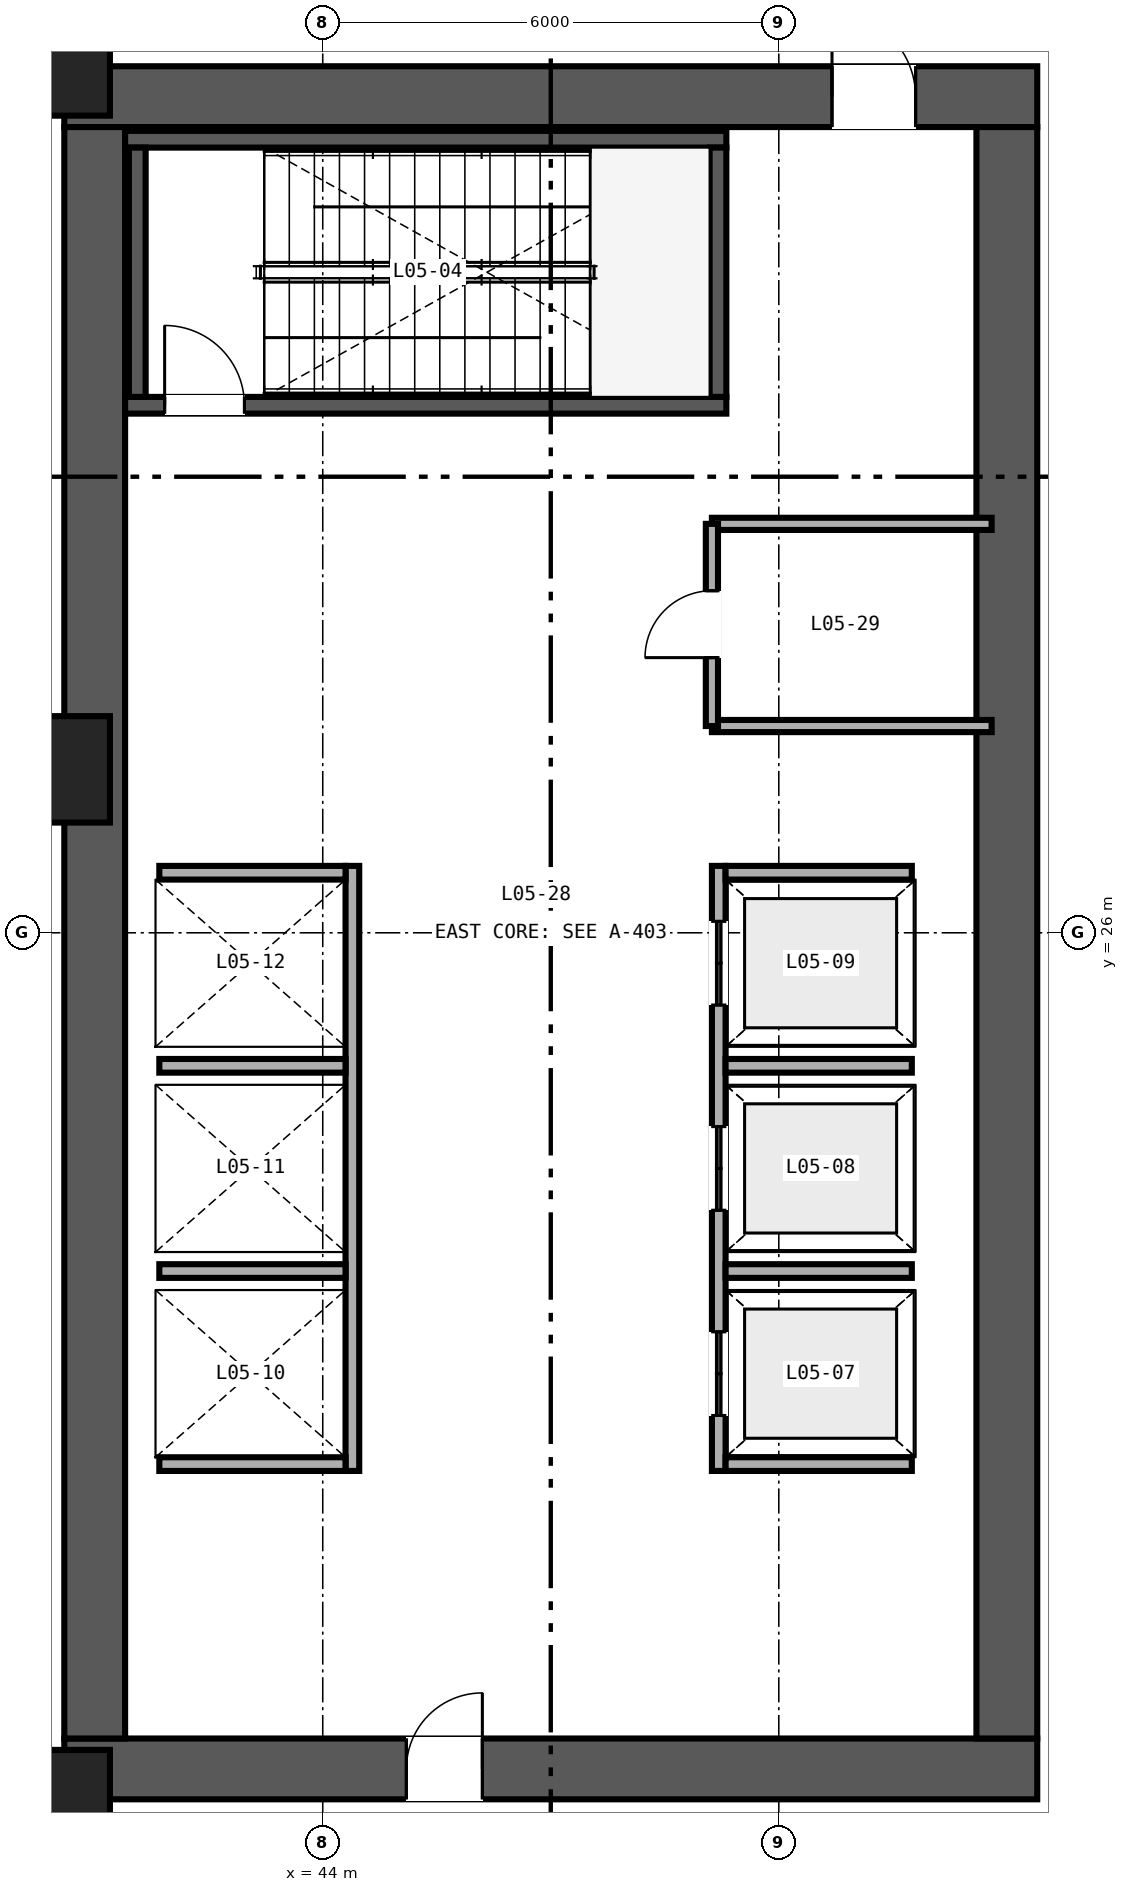
"""IFC4 building model, lengths in metres.
Left out: names, types, materials, properties, quantities, classifications, styles, units other than length and angle.
Written with IfcOpenShell. Run it as: python <this file> out.ifc"""

import sys

from ifc_helpers import new_model, si_unit, direction, frame, frame_2d, origin, origin_2d, place, context, subcontext, project, spatial, rectangle, extrude, source, transform, mapped, element, fill, save


model = new_model("IFC4")
c1 = context("Model", 3, precision=1e-05, world=origin(), true_north=direction((0.0, 1.0)))
c2 = subcontext(c1, "Body", "Model", "MODEL_VIEW")
j1 = project(units=[si_unit("LENGTHUNIT", "METRE"), si_unit("PLANEANGLEUNIT", "RADIAN")], contexts=[c1])
p1 = place(None, origin())
s1 = spatial("IfcSite", under=j1, at=p1, CompositionType="ELEMENT")
p2 = place(p1, origin())
s2 = spatial("IfcBuilding", under=s1, at=p2, CompositionType="ELEMENT")
p3 = place(p2, frame((0.0, 0.0, 24.0)))
s3 = spatial("IfcBuildingStorey", under=s2, at=p3, CompositionType="ELEMENT", Elevation=24.0)
p4 = place(p3, frame((40.6, 15.0, 0.0), z_axis=(0.0, 0.0, 1.0), x_axis=(1.0, 0.0, 0.0)))
e1 = element("IfcWall", 1, at=p4, inside=s3, PredefinedType="SHEAR", context=c2, shape_type="SweptSolid", body=[
    extrude(rectangle(XDim=12.8, YDim=0.8, at=frame_2d((6.4, 0.0))), origin(), (0.0, 0.0, 1.0), 4.48),
])
p5 = place(p4, frame((4.5, 0.0, 0.0)))
e2 = element("IfcOpeningElement", 2, at=p5, cuts=e1, PredefinedType="OPENING", context=c2, shape_type="SweptSolid", body=[
    extrude(rectangle(XDim=1.0, YDim=2.15, at=frame_2d((0.5, 1.075))), frame((0.0, 0.41, 0.0), z_axis=(0.0, -1.0, 0.0), x_axis=(1.0, 0.0, 0.0)), (0.0, 0.0, 1.0), 0.82),
])
p6 = place(p3, frame((40.6, 37.0, 0.0), z_axis=(0.0, 0.0, 1.0), x_axis=(1.0, 0.0, 0.0)))
e3 = element("IfcWall", 3, at=p6, inside=s3, PredefinedType="SHEAR", context=c2, shape_type="SweptSolid", body=[
    extrude(rectangle(XDim=12.8, YDim=0.8, at=frame_2d((6.4, 0.0))), origin(), (0.0, 0.0, 1.0), 4.48),
])
p7 = place(p6, frame((10.1, 0.0, 0.0)))
e4 = element("IfcOpeningElement", 4, at=p7, cuts=e3, PredefinedType="OPENING", context=c2, shape_type="SweptSolid", body=[
    extrude(rectangle(XDim=1.1, YDim=2.15, at=frame_2d((0.55, 1.075))), frame((0.0, 0.41, 0.0), z_axis=(0.0, -1.0, 0.0), x_axis=(1.0, 0.0, 0.0)), (0.0, 0.0, 1.0), 0.82),
])
for number, where, z_axis, x_axis in (
    (5, (41.0, 15.4, 0.0), (0.0, 0.0, 1.0), (0.0, 1.0, 0.0)),
    (6, (53.0, 15.4, 0.0), (0.0, 0.0, 1.0), (0.0, 1.0, 0.0)),
):
    element("IfcWall", number, at=place(p3, frame(where, z_axis=z_axis, x_axis=x_axis)), inside=s3, PredefinedType="SHEAR", context=c2, shape_type="SweptSolid", body=[
        extrude(rectangle(XDim=21.2, YDim=0.8, at=frame_2d((10.6, 0.0))), origin(), (0.0, 0.0, 1.0), 4.48),
    ])
p8 = place(p3, frame((41.4, 32.94, 0.0), z_axis=(0.0, 0.0, 1.0), x_axis=(1.0, 0.0, 0.0)))
e7 = element("IfcWall", 7, at=p8, inside=s3, PredefinedType="SHEAR", context=c2, shape_type="SweptSolid", body=[
    extrude(rectangle(XDim=7.91, YDim=0.22, at=frame_2d((3.955, 0.0))), origin(), (0.0, 0.0, 1.0), 4.6),
])
p9 = place(p8, frame((0.52, 0.0, 0.0)))
e8 = element("IfcOpeningElement", 8, at=p9, cuts=e7, PredefinedType="OPENING", context=c2, shape_type="SweptSolid", body=[
    extrude(rectangle(XDim=1.05, YDim=2.15, at=frame_2d((0.525, 1.075))), frame((0.0, 0.12, 0.0), z_axis=(0.0, -1.0, 0.0), x_axis=(1.0, 0.0, 0.0)), (0.0, 0.0, 1.0), 0.24),
])
p10 = place(p3, frame((41.4, 36.44, 0.0), z_axis=(0.0, 0.0, 1.0), x_axis=(1.0, 0.0, 0.0)))
e9 = element("IfcWall", 9, at=p10, inside=s3, PredefinedType="SHEAR", context=c2, shape_type="SweptSolid", body=[
    extrude(rectangle(XDim=7.91, YDim=0.22, at=frame_2d((3.955, 0.0))), origin(), (0.0, 0.0, 1.0), 4.6),
])
for number, where, z_axis, x_axis in (
    (10, (41.56, 33.05, 0.0), (0.0, 0.0, 1.0), (0.0, 1.0, 0.0)),
    (11, (49.2, 33.05, 0.0), (0.0, 0.0, 1.0), (0.0, 1.0, 0.0)),
):
    element("IfcWall", number, at=place(p3, frame(where, z_axis=z_axis, x_axis=x_axis)), inside=s3, PredefinedType="SHEAR", context=c2, shape_type="SweptSolid", body=[
        extrude(rectangle(XDim=3.28, YDim=0.22, at=frame_2d((1.64, 0.0))), origin(), (0.0, 0.0, 1.0), 4.6),
    ])
m1 = source(origin(), c2, "Body", "SweptSolid", [
    extrude(rectangle(XDim=1.4, YDim=1.4, at=origin_2d()), origin(), (0.0, 0.0, 1.0), 4.48),
])
for number, where, z_axis, x_axis in (
    (12, (40.5, 14.55, 0.0), (0.0, 0.0, 1.0), (1.0, 0.0, 0.0)),
    (13, (40.5, 28.15, 0.0), (0.0, 0.0, 1.0), (1.0, 0.0, 0.0)),
    (14, (40.5, 37.45, 0.0), (0.0, 0.0, 1.0), (1.0, 0.0, 0.0)),
):
    element("IfcColumn", number, at=place(p3, frame(where, z_axis=z_axis, x_axis=x_axis)), inside=s3, PredefinedType="COLUMN", context=c2, shape_type="MappedRepresentation", body=[
        mapped(m1, transform((0.0, 0.0, 0.0), scale=1.0)),
    ])
p11 = place(p3, frame((49.21, 18.92, 0.0), z_axis=(0.0, 0.0, 1.0), x_axis=(0.0, 1.0, 0.0)))
e15 = element("IfcWall", 15, at=p11, inside=s3, PredefinedType="SOLIDWALL", context=c2, shape_type="SweptSolid", body=[
    extrude(rectangle(XDim=7.96, YDim=0.18, at=frame_2d((3.98, 0.0))), origin(), (0.0, 0.0, 1.0), 4.48),
])
p12 = place(p11, frame((0.73, 0.0, 0.0)))
e16 = element("IfcOpeningElement", 16, at=p12, cuts=e15, PredefinedType="OPENING", context=c2, shape_type="SweptSolid", body=[
    extrude(rectangle(XDim=1.1, YDim=2.2, at=frame_2d((0.55, 1.1))), frame((0.0, 0.1, 0.0), z_axis=(0.0, -1.0, 0.0), x_axis=(1.0, 0.0, 0.0)), (0.0, 0.0, 1.0), 0.2),
])
p13 = place(p11, frame((3.43, 0.0, 0.0)))
e17 = element("IfcOpeningElement", 17, at=p13, cuts=e15, PredefinedType="OPENING", context=c2, shape_type="SweptSolid", body=[
    extrude(rectangle(XDim=1.1, YDim=2.2, at=frame_2d((0.55, 1.1))), frame((0.0, 0.1, 0.0), z_axis=(0.0, -1.0, 0.0), x_axis=(1.0, 0.0, 0.0)), (0.0, 0.0, 1.0), 0.2),
])
p14 = place(p11, frame((6.13, 0.0, 0.0)))
e18 = element("IfcOpeningElement", 18, at=p14, cuts=e15, PredefinedType="OPENING", context=c2, shape_type="SweptSolid", body=[
    extrude(rectangle(XDim=1.1, YDim=2.2, at=frame_2d((0.55, 1.1))), frame((0.0, 0.1, 0.0), z_axis=(0.0, -1.0, 0.0), x_axis=(1.0, 0.0, 0.0)), (0.0, 0.0, 1.0), 0.2),
])
for number, where, z_axis, x_axis in (
    (19, (49.3, 19.01, 0.0), (0.0, 0.0, 1.0), (1.0, 0.0, 0.0)),
    (20, (49.3, 26.79, 0.0), (0.0, 0.0, 1.0), (1.0, 0.0, 0.0)),
    (21, (49.3, 21.55, 0.0), (0.0, 0.0, 1.0), (1.0, 0.0, 0.0)),
    (22, (49.3, 24.25, 0.0), (0.0, 0.0, 1.0), (1.0, 0.0, 0.0)),
):
    element("IfcWall", number, at=place(p3, frame(where, z_axis=z_axis, x_axis=x_axis)), inside=s3, PredefinedType="SOLIDWALL", context=c2, shape_type="SweptSolid", body=[
        extrude(rectangle(XDim=2.45, YDim=0.18, at=frame_2d((1.225, 0.0))), origin(), (0.0, 0.0, 1.0), 4.48),
    ])
p15 = place(p3, frame((44.39, 18.92, 0.0), z_axis=(0.0, 0.0, 1.0), x_axis=(0.0, 1.0, 0.0)))
e23 = element("IfcWall", 23, at=p15, inside=s3, PredefinedType="SOLIDWALL", context=c2, shape_type="SweptSolid", body=[
    extrude(rectangle(XDim=7.96, YDim=0.18, at=frame_2d((3.98, 0.0))), origin(), (0.0, 0.0, 1.0), 4.48),
])
for number, where, z_axis, x_axis in (
    (24, (41.85, 19.01, 0.0), (0.0, 0.0, 1.0), (1.0, 0.0, 0.0)),
    (25, (41.85, 26.79, 0.0), (0.0, 0.0, 1.0), (1.0, 0.0, 0.0)),
    (26, (41.85, 21.55, 0.0), (0.0, 0.0, 1.0), (1.0, 0.0, 0.0)),
    (27, (41.85, 24.25, 0.0), (0.0, 0.0, 1.0), (1.0, 0.0, 0.0)),
):
    element("IfcWall", number, at=place(p3, frame(where, z_axis=z_axis, x_axis=x_axis)), inside=s3, PredefinedType="SOLIDWALL", context=c2, shape_type="SweptSolid", body=[
        extrude(rectangle(XDim=2.45, YDim=0.18, at=frame_2d((1.225, 0.0))), origin(), (0.0, 0.0, 1.0), 4.48),
    ])
p16 = place(p3, frame((49.12, 28.72, 0.0), z_axis=(0.0, 0.0, 1.0), x_axis=(1.0, 0.0, 0.0)))
e28 = element("IfcWall", 28, at=p16, inside=s3, PredefinedType="PARTITIONING", context=c2, shape_type="SweptSolid", body=[
    extrude(rectangle(XDim=3.68, YDim=0.16, at=frame_2d((1.84, 0.0))), origin(), (0.0, 0.0, 1.0), 4.48),
])
p17 = place(p3, frame((49.12, 31.38, 0.0), z_axis=(0.0, 0.0, 1.0), x_axis=(1.0, 0.0, 0.0)))
e29 = element("IfcWall", 29, at=p17, inside=s3, PredefinedType="PARTITIONING", context=c2, shape_type="SweptSolid", body=[
    extrude(rectangle(XDim=3.68, YDim=0.16, at=frame_2d((1.84, 0.0))), origin(), (0.0, 0.0, 1.0), 3.38),
])
p18 = place(p3, frame((49.12, 28.72, 0.0), z_axis=(0.0, 0.0, 1.0), x_axis=(0.0, 1.0, 0.0)))
e30 = element("IfcWall", 30, at=p18, inside=s3, PredefinedType="PARTITIONING", context=c2, shape_type="SweptSolid", body=[
    extrude(rectangle(XDim=2.66, YDim=0.16, at=frame_2d((1.33, 0.0))), origin(), (0.0, 0.0, 1.0), 3.38),
])
p19 = place(p18, frame((0.9, 0.0, 0.0)))
e31 = element("IfcOpeningElement", 31, at=p19, cuts=e30, PredefinedType="OPENING", context=c2, shape_type="SweptSolid", body=[
    extrude(rectangle(XDim=0.88, YDim=2.15, at=frame_2d((0.44, 1.075))), frame((0.0, 0.09, 0.0), z_axis=(0.0, -1.0, 0.0), x_axis=(1.0, 0.0, 0.0)), (0.0, 0.0, 1.0), 0.18),
])
m2 = source(origin(), c2, "Body", "SweptSolid", [
    extrude(rectangle(XDim=1.05, YDim=2.15, at=frame_2d((0.525, 1.075))), frame((0.0, 0.025, 0.0), z_axis=(0.0, -1.0, 0.0), x_axis=(1.0, 0.0, 0.0)), (0.0, 0.0, 1.0), 0.05),
])
p20 = place(p9, origin())
e32 = element("IfcDoor", 32, at=p20, inside=s3, OperationType="SINGLE_SWING_LEFT", PredefinedType="DOOR", context=c2, shape_type="MappedRepresentation", body=[
    mapped(m2, transform((0.0, 0.0, 0.0), scale=1.0)),
])
fill(e8, e32)
m3 = source(origin(), c2, "Body", "SweptSolid", [
    extrude(rectangle(XDim=1.1, YDim=2.2, at=frame_2d((0.55, 1.1))), frame((0.0, 0.025, 0.0), z_axis=(0.0, -1.0, 0.0), x_axis=(1.0, 0.0, 0.0)), (0.0, 0.0, 1.0), 0.05),
])
p21 = place(p12, origin())
e33 = element("IfcDoor", 33, at=p21, inside=s3, OperationType="DOUBLE_DOOR_SLIDING", PredefinedType="DOOR", context=c2, shape_type="MappedRepresentation", body=[
    mapped(m3, transform((0.0, 0.0, 0.0), scale=1.0)),
])
fill(e16, e33)
p22 = place(p13, origin())
e34 = element("IfcDoor", 34, at=p22, inside=s3, OperationType="DOUBLE_DOOR_SLIDING", PredefinedType="DOOR", context=c2, shape_type="MappedRepresentation", body=[
    mapped(m3, transform((0.0, 0.0, 0.0), scale=1.0)),
])
fill(e17, e34)
p23 = place(p14, origin())
e35 = element("IfcDoor", 35, at=p23, inside=s3, OperationType="DOUBLE_DOOR_SLIDING", PredefinedType="DOOR", context=c2, shape_type="MappedRepresentation", body=[
    mapped(m3, transform((0.0, 0.0, 0.0), scale=1.0)),
])
fill(e18, e35)
m4 = source(origin(), c2, "Body", "SweptSolid", [
    extrude(rectangle(XDim=1.0, YDim=2.15, at=frame_2d((0.5, 1.075))), frame((0.0, 0.025, 0.0), z_axis=(0.0, -1.0, 0.0), x_axis=(1.0, 0.0, 0.0)), (0.0, 0.0, 1.0), 0.05),
])
p24 = place(p5, origin())
e36 = element("IfcDoor", 36, at=p24, inside=s3, OperationType="SINGLE_SWING_RIGHT", PredefinedType="DOOR", context=c2, shape_type="MappedRepresentation", body=[
    mapped(m4, transform((0.0, 0.0, 0.0), scale=1.0)),
])
fill(e2, e36)
m5 = source(origin(), c2, "Body", "SweptSolid", [
    extrude(rectangle(XDim=1.1, YDim=2.15, at=frame_2d((0.55, 1.075))), frame((0.0, 0.025, 0.0), z_axis=(0.0, -1.0, 0.0), x_axis=(1.0, 0.0, 0.0)), (0.0, 0.0, 1.0), 0.05),
])
p25 = place(p7, origin())
e37 = element("IfcDoor", 37, at=p25, inside=s3, OperationType="SINGLE_SWING_LEFT", PredefinedType="DOOR", context=c2, shape_type="MappedRepresentation", body=[
    mapped(m5, transform((0.0, 0.0, 0.0), scale=1.0)),
])
fill(e4, e37)
m6 = source(origin(), c2, "Body", "SweptSolid", [
    extrude(rectangle(XDim=0.88, YDim=2.15, at=frame_2d((0.44, 1.075))), frame((0.0, 0.025, 0.0), z_axis=(0.0, -1.0, 0.0), x_axis=(1.0, 0.0, 0.0)), (0.0, 0.0, 1.0), 0.05),
])
p26 = place(p19, origin())
e38 = element("IfcDoor", 38, at=p26, inside=s3, OperationType="SINGLE_SWING_LEFT", PredefinedType="DOOR", context=c2, shape_type="MappedRepresentation", body=[
    mapped(m6, transform((0.0, 0.0, 0.0), scale=1.0)),
])
fill(e31, e38)
save(model, sys.argv[1])
